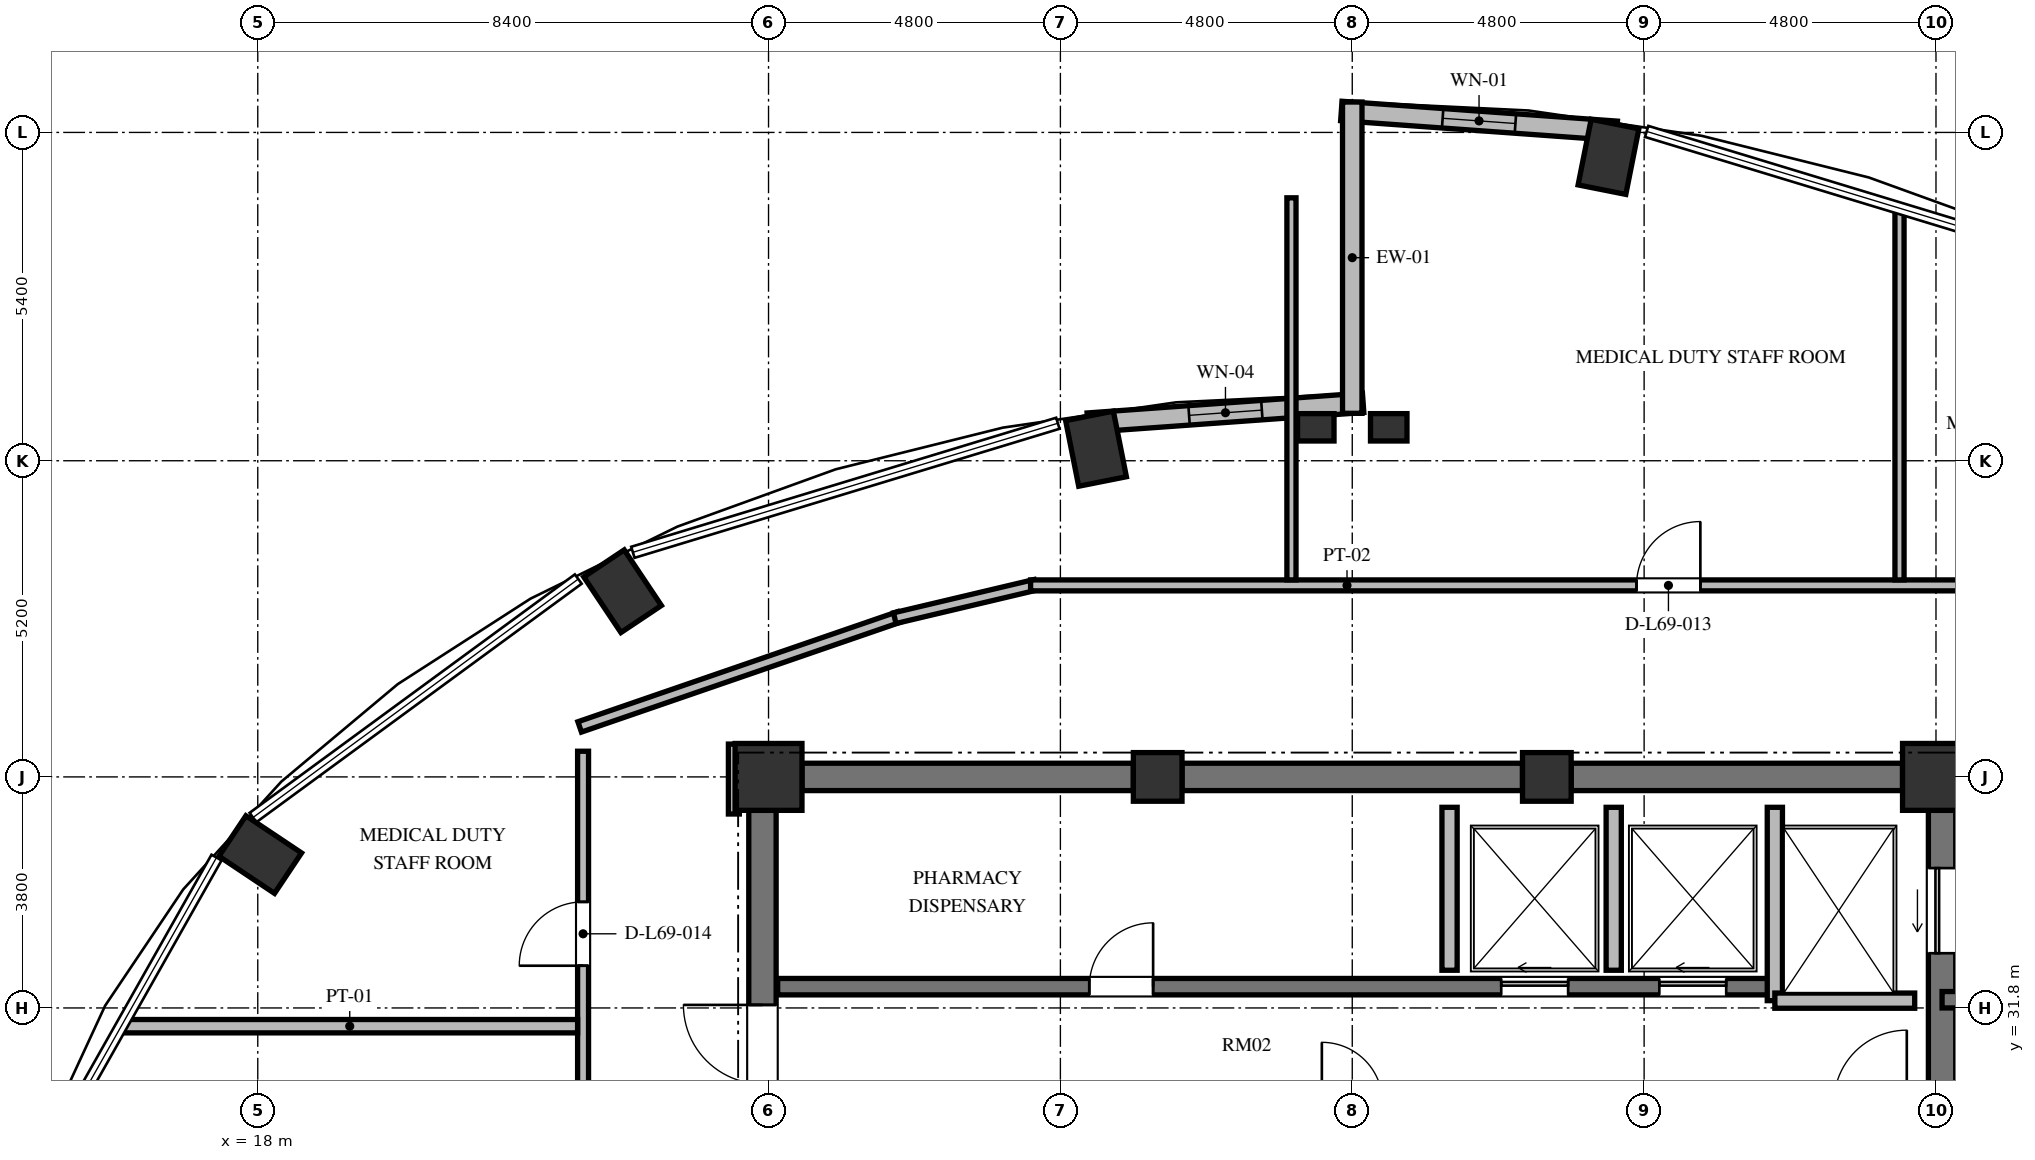
"""IFC4 building model, lengths in metres.
Left out: names, types, materials, properties, quantities, classifications, styles, units other than length and angle.
Written with IfcOpenShell. Run it as: python <this file> out.ifc"""

import sys

from ifc_helpers import new_model, si_unit, direction, frame, frame_2d, origin, origin_2d, place, context, subcontext, project, spatial, rectangle, extrude, element, fill, save


model = new_model("IFC4")
c1 = context("Model", 3, precision=1e-05, world=origin(), true_north=direction((0.0, 1.0)))
c2 = subcontext(c1, "Body", "Model", "MODEL_VIEW")
j1 = project(units=[si_unit("LENGTHUNIT", "METRE"), si_unit("PLANEANGLEUNIT", "RADIAN")], contexts=[c1])
p1 = place(None, origin())
s1 = spatial("IfcSite", under=j1, at=p1, CompositionType="ELEMENT")
p2 = place(p1, origin())
s2 = spatial("IfcBuilding", under=s1, at=p2, CompositionType="ELEMENT")
p3 = place(p2, frame((0.0, 0.0, 265.968)))
s3 = spatial("IfcBuildingStorey", under=s2, at=p3, CompositionType="ELEMENT", Elevation=265.968)
for number, where, z_axis, x_axis in (
    (1, (40.214, 45.798, 0.0), (0.0, 0.0, 1.0), (0.195, 0.981, 0.0)),
    (2, (31.786, 40.998, 0.0), (0.0, 0.0, 1.0), (-0.195, 0.981, 0.0)),
    (3, (24.0, 38.654, 0.0), (0.0, 0.0, 1.0), (-0.556, 0.831, 0.0)),
    (4, (18.04, 34.323, 0.0), (0.0, 0.0, 1.0), (-0.831, 0.556, 0.0)),
):
    element("IfcColumn", number, at=place(p3, frame(where, z_axis=z_axis, x_axis=x_axis)), inside=s3, PredefinedType="COLUMN", context=c2, shape_type="SweptSolid", body=[
        extrude(rectangle(XDim=1.1, YDim=0.8, at=origin_2d()), origin(), (0.0, 0.0, 1.0), 3.648),
    ])
p4 = place(p3, frame((45.6, 35.6, 0.0), z_axis=(0.0, 0.0, 1.0), x_axis=(1.0, 0.0, 0.0)))
e5 = element("IfcColumn", 5, at=p4, inside=s3, PredefinedType="COLUMN", context=c2, shape_type="SweptSolid", body=[
    extrude(rectangle(XDim=1.1, YDim=1.1, at=origin_2d()), origin(), (0.0, 0.0, 1.0), 3.648),
])
for number, where, z_axis, x_axis in (
    (6, (39.2, 35.6, 0.0), (0.0, 0.0, 1.0), (1.0, 0.0, 0.0)),
    (7, (32.8, 35.6, 0.0), (0.0, 0.0, 1.0), (1.0, 0.0, 0.0)),
):
    element("IfcColumn", number, at=place(p3, frame(where, z_axis=z_axis, x_axis=x_axis)), inside=s3, PredefinedType="COLUMN", context=c2, shape_type="SweptSolid", body=[
        extrude(rectangle(XDim=0.8, YDim=0.8, at=origin_2d()), origin(), (0.0, 0.0, 1.0), 3.648),
    ])
p5 = place(p3, frame((26.4, 35.6, 0.0), z_axis=(0.0, 0.0, 1.0), x_axis=(1.0, 0.0, 0.0)))
e8 = element("IfcColumn", 8, at=p5, inside=s3, PredefinedType="COLUMN", context=c2, shape_type="SweptSolid", body=[
    extrude(rectangle(XDim=1.1, YDim=1.1, at=origin_2d()), origin(), (0.0, 0.0, 1.0), 3.648),
])
for number, where, z_axis, x_axis in (
    (9, (35.4, 41.35, 0.0), (0.0, 0.0, 1.0), (1.0, 0.0, 0.0)),
    (10, (36.6, 41.35, 0.0), (0.0, 0.0, 1.0), (1.0, 0.0, 0.0)),
):
    element("IfcColumn", number, at=place(p3, frame(where, z_axis=z_axis, x_axis=x_axis)), inside=s3, PredefinedType="PILASTER", context=c2, shape_type="SweptSolid", body=[
        extrude(rectangle(XDim=0.6, YDim=0.45, at=origin_2d()), origin(), (0.0, 0.0, 1.0), 3.648),
    ])
p6 = place(p3, frame((26.3, 20.95, 0.0), z_axis=(0.0, 0.0, 1.0), x_axis=(0.0, 1.0, 0.0)))
e11 = element("IfcWall", 11, at=p6, inside=s3, PredefinedType="SHEAR", context=c2, shape_type="SweptSolid", body=[
    extrude(rectangle(XDim=14.1, YDim=0.45, at=frame_2d((7.05, 0.0))), origin(), (0.0, 0.0, 1.0), 3.648),
])
p7 = place(p6, frame((6.5, 0.0, 0.0)))
e12 = element("IfcOpeningElement", 12, at=p7, cuts=e11, PredefinedType="OPENING", context=c2, shape_type="SweptSolid", body=[
    extrude(rectangle(XDim=1.2, YDim=2.15, at=frame_2d((0.6, 1.075))), frame((0.0, 0.235, 0.0), z_axis=(0.0, -1.0, 0.0), x_axis=(1.0, 0.0, 0.0)), (0.0, 0.0, 1.0), 0.47),
])
p8 = place(p6, frame((9.6, 0.0, 0.0)))
e13 = element("IfcOpeningElement", 13, at=p8, cuts=e11, PredefinedType="OPENING", context=c2, shape_type="SweptSolid", body=[
    extrude(rectangle(XDim=1.3, YDim=2.2, at=frame_2d((0.65, 1.1))), frame((0.0, 0.235, 0.0), z_axis=(0.0, -1.0, 0.0), x_axis=(1.0, 0.0, 0.0)), (0.0, 0.0, 1.0), 0.47),
])
p9 = place(p6, frame((2.85, 0.0, 0.0)))
e14 = element("IfcOpeningElement", 14, at=p9, cuts=e11, PredefinedType="OPENING", context=c2, shape_type="SweptSolid", body=[
    extrude(rectangle(XDim=1.0, YDim=2.04, at=frame_2d((0.5, 1.02))), frame((0.0, 0.235, 0.0), z_axis=(0.0, -1.0, 0.0), x_axis=(1.0, 0.0, 0.0)), (0.0, 0.0, 1.0), 0.47),
])
p10 = place(p3, frame((45.7, 20.95, 0.0), z_axis=(0.0, 0.0, 1.0), x_axis=(0.0, 1.0, 0.0)))
e15 = element("IfcWall", 15, at=p10, inside=s3, PredefinedType="SHEAR", context=c2, shape_type="SweptSolid", body=[
    extrude(rectangle(XDim=14.1, YDim=0.45, at=frame_2d((7.05, 0.0))), origin(), (0.0, 0.0, 1.0), 3.648),
])
p11 = place(p10, frame((11.75, 0.0, 0.0)))
e16 = element("IfcOpeningElement", 16, at=p11, cuts=e15, PredefinedType="OPENING", context=c2, shape_type="SweptSolid", body=[
    extrude(rectangle(XDim=1.4, YDim=2.3, at=frame_2d((0.7, 1.15))), frame((0.0, 0.235, 0.0), z_axis=(0.0, -1.0, 0.0), x_axis=(1.0, 0.0, 0.0)), (0.0, 0.0, 1.0), 0.47),
])
p12 = place(p10, frame((0.95, 0.0, 0.0)))
e17 = element("IfcOpeningElement", 17, at=p12, cuts=e15, PredefinedType="OPENING", context=c2, shape_type="SweptSolid", body=[
    extrude(rectangle(XDim=1.4, YDim=2.3, at=frame_2d((0.7, 1.15))), frame((0.0, 0.235, 0.0), z_axis=(0.0, -1.0, 0.0), x_axis=(1.0, 0.0, 0.0)), (0.0, 0.0, 1.0), 0.47),
])
p13 = place(p3, frame((26.95, 35.6, 0.0), z_axis=(0.0, 0.0, 1.0), x_axis=(1.0, 0.0, 0.0)))
e18 = element("IfcWall", 18, at=p13, inside=s3, PredefinedType="SHEAR", context=c2, shape_type="SweptSolid", body=[
    extrude(rectangle(XDim=5.45, YDim=0.45, at=frame_2d((2.725, 0.0))), origin(), (0.0, 0.0, 1.0), 3.648),
])
p14 = place(p3, frame((33.2, 35.6, 0.0), z_axis=(0.0, 0.0, 1.0), x_axis=(1.0, 0.0, 0.0)))
e19 = element("IfcWall", 19, at=p14, inside=s3, PredefinedType="SHEAR", context=c2, shape_type="SweptSolid", body=[
    extrude(rectangle(XDim=5.6, YDim=0.45, at=frame_2d((2.8, 0.0))), origin(), (0.0, 0.0, 1.0), 3.648),
])
p15 = place(p3, frame((39.6, 35.6, 0.0), z_axis=(0.0, 0.0, 1.0), x_axis=(1.0, 0.0, 0.0)))
e20 = element("IfcWall", 20, at=p15, inside=s3, PredefinedType="SHEAR", context=c2, shape_type="SweptSolid", body=[
    extrude(rectangle(XDim=5.45, YDim=0.45, at=frame_2d((2.725, 0.0))), origin(), (0.0, 0.0, 1.0), 3.648),
])
p16 = place(p3, frame((40.35, 46.226, 0.0), z_axis=(0.0, 0.0, 1.0), x_axis=(-0.997409061056, 0.071938619141, 0.0)))
e21 = element("IfcWall", 21, at=p16, inside=s3, PredefinedType="SOLIDWALL", context=c2, shape_type="SweptSolid", body=[
    extrude(rectangle(XDim=4.541, YDim=0.32, at=frame_2d((2.271, 0.0))), origin(), (0.0, 0.0, 1.0), 3.198),
])
p17 = place(p16, frame((1.67, 0.0, 0.85)))
e22 = element("IfcOpeningElement", 22, at=p17, cuts=e21, PredefinedType="OPENING", context=c2, shape_type="SweptSolid", body=[
    extrude(rectangle(XDim=1.2, YDim=2.2, at=frame_2d((0.6, 1.1))), frame((0.0, 0.17, 0.0), z_axis=(0.0, -1.0, 0.0), x_axis=(1.0, 0.0, 0.0)), (0.0, 0.0, 1.0), 0.34),
])
p18 = place(p3, frame((36.179, 41.753, 0.0), z_axis=(0.0, 0.0, 1.0), x_axis=(-0.997408782787, -0.071942477163, 0.0)))
e23 = element("IfcWall", 23, at=p18, inside=s3, PredefinedType="SOLIDWALL", context=c2, shape_type="SweptSolid", body=[
    extrude(rectangle(XDim=4.541, YDim=0.32, at=frame_2d((2.27, 0.0))), origin(), (0.0, 0.0, 1.0), 3.198),
])
p19 = place(p18, frame((1.67, 0.0, 0.833)))
e24 = element("IfcOpeningElement", 24, at=p19, cuts=e23, PredefinedType="OPENING", context=c2, shape_type="SweptSolid", body=[
    extrude(rectangle(XDim=1.2, YDim=1.8, at=frame_2d((0.6, 0.9))), frame((0.0, 0.17, 0.0), z_axis=(0.0, -1.0, 0.0), x_axis=(1.0, 0.0, 0.0)), (0.0, 0.0, 1.0), 0.34),
])
p20 = place(p3, frame((36.0, 46.7, 0.0), z_axis=(0.0, 0.0, 1.0), x_axis=(0.0, -1.0, 0.0)))
e25 = element("IfcWall", 25, at=p20, inside=s3, PredefinedType="SOLIDWALL", context=c2, shape_type="SweptSolid", body=[
    extrude(rectangle(XDim=5.12, YDim=0.32, at=frame_2d((2.56, 0.0))), origin(), (0.0, 0.0, 1.0), 3.198),
])
p21 = place(p3, frame((26.55, 32.15, 0.0), z_axis=(0.0, 0.0, 1.0), x_axis=(1.0, 0.0, 0.0)))
e26 = element("IfcWall", 26, at=p21, inside=s3, PredefinedType="SHEAR", context=c2, shape_type="SweptSolid", body=[
    extrude(rectangle(XDim=16.4, YDim=0.27, at=frame_2d((8.2, 0.0))), origin(), (0.0, 0.0, 1.0), 3.648),
])
p22 = place(p21, frame((5.125, 0.0, 0.0)))
e27 = element("IfcOpeningElement", 27, at=p22, cuts=e26, PredefinedType="OPENING", context=c2, shape_type="SweptSolid", body=[
    extrude(rectangle(XDim=1.05, YDim=2.15, at=frame_2d((0.525, 1.075))), frame((0.0, 0.145, 0.0), z_axis=(0.0, -1.0, 0.0), x_axis=(1.0, 0.0, 0.0)), (0.0, 0.0, 1.0), 0.29),
])
p23 = place(p21, frame((11.9, 0.0, 0.0)))
e28 = element("IfcOpeningElement", 28, at=p23, cuts=e26, PredefinedType="OPENING", context=c2, shape_type="SweptSolid", body=[
    extrude(rectangle(XDim=1.1, YDim=2.2, at=frame_2d((0.55, 1.1))), frame((0.0, 0.145, 0.0), z_axis=(0.0, -1.0, 0.0), x_axis=(1.0, 0.0, 0.0)), (0.0, 0.0, 1.0), 0.29),
])
p24 = place(p21, frame((14.5, 0.0, 0.0)))
e29 = element("IfcOpeningElement", 29, at=p24, cuts=e26, PredefinedType="OPENING", context=c2, shape_type="SweptSolid", body=[
    extrude(rectangle(XDim=1.1, YDim=2.2, at=frame_2d((0.55, 1.1))), frame((0.0, 0.145, 0.0), z_axis=(0.0, -1.0, 0.0), x_axis=(1.0, 0.0, 0.0)), (0.0, 0.0, 1.0), 0.29),
])
p25 = place(p3, frame((42.95, 31.92, 0.0), z_axis=(0.0, 0.0, 1.0), x_axis=(0.0, 1.0, 0.0)))
e30 = element("IfcWall", 30, at=p25, inside=s3, PredefinedType="SOLIDWALL", context=c2, shape_type="SweptSolid", body=[
    extrude(rectangle(XDim=3.18, YDim=0.25, at=frame_2d((1.59, 0.0))), origin(), (0.0, 0.0, 1.0), 3.198),
])
p26 = place(p3, frame((42.95, 31.92, 0.0), z_axis=(0.0, 0.0, 1.0), x_axis=(1.0, 0.0, 0.0)))
e31 = element("IfcWall", 31, at=p26, inside=s3, PredefinedType="SOLIDWALL", context=c2, shape_type="SweptSolid", body=[
    extrude(rectangle(XDim=2.3, YDim=0.25, at=frame_2d((1.15, 0.0))), origin(), (0.0, 0.0, 1.0), 3.198),
])
for number, where, z_axis, x_axis in (
    (32, (37.6, 32.42, 0.0), (0.0, 0.0, 1.0), (0.0, 1.0, 0.0)),
    (33, (40.3, 32.42, 0.0), (0.0, 0.0, 1.0), (0.0, 1.0, 0.0)),
):
    element("IfcWall", number, at=place(p3, frame(where, z_axis=z_axis, x_axis=x_axis)), inside=s3, PredefinedType="SOLIDWALL", context=c2, shape_type="SweptSolid", body=[
        extrude(rectangle(XDim=2.68, YDim=0.25, at=frame_2d((1.34, 0.0))), origin(), (0.0, 0.0, 1.0), 3.198),
    ])
p27 = place(p3, frame((45.7, 31.935, 0.0), z_axis=(0.0, 0.0, 1.0), x_axis=(1.0, 0.0, 0.0)))
e34 = element("IfcWall", 34, at=p27, inside=s3, PredefinedType="SHEAR", context=c2, shape_type="SweptSolid", body=[
    extrude(rectangle(XDim=4.715, YDim=0.27, at=frame_2d((2.357, 0.0))), origin(), (0.0, 0.0, 1.0), 3.648),
])
p28 = place(p3, frame((23.294, 36.422, 0.0), z_axis=(0.0, 0.0, 1.0), x_axis=(0.945493277461, 0.325641616316, 0.0)))
e35 = element("IfcWall", 35, at=p28, inside=s3, PredefinedType="PARTITIONING", context=c2, shape_type="SweptSolid", body=[
    extrude(rectangle(XDim=5.562, YDim=0.18, at=frame_2d((2.781, 0.0))), origin(), (0.0, 0.0, 1.0), 2.283),
])
p29 = place(p3, frame((28.476, 38.211, 0.0), z_axis=(0.0, 0.0, 1.0), x_axis=(0.973030562203, 0.230676234189, 0.0)))
e36 = element("IfcWall", 36, at=p29, inside=s3, PredefinedType="PARTITIONING", context=c2, shape_type="SweptSolid", body=[
    extrude(rectangle(XDim=2.377, YDim=0.18, at=frame_2d((1.188, 0.0))), origin(), (0.0, 0.0, 1.0), 3.198),
])
p30 = place(p3, frame((30.71, 38.75, 0.0), z_axis=(0.0, 0.0, 1.0), x_axis=(1.0, 0.0, 0.0)))
e37 = element("IfcWall", 37, at=p30, inside=s3, PredefinedType="PARTITIONING", context=c2, shape_type="SweptSolid", body=[
    extrude(rectangle(XDim=20.815, YDim=0.18, at=frame_2d((10.408, 0.0))), origin(), (0.0, 0.0, 1.0), 2.823),
])
p31 = place(p30, frame((16.869, 0.0, 0.0)))
e38 = element("IfcOpeningElement", 38, at=p31, cuts=e37, PredefinedType="OPENING", context=c2, shape_type="SweptSolid", body=[
    extrude(rectangle(XDim=1.05, YDim=2.15, at=frame_2d((0.525, 1.075))), frame((0.0, 0.1, 0.0), z_axis=(0.0, -1.0, 0.0), x_axis=(1.0, 0.0, 0.0)), (0.0, 0.0, 1.0), 0.2),
])
p32 = place(p30, frame((9.965, 0.0, 0.0)))
e39 = element("IfcOpeningElement", 39, at=p32, cuts=e37, PredefinedType="OPENING", context=c2, shape_type="SweptSolid", body=[
    extrude(rectangle(XDim=1.05, YDim=2.15, at=frame_2d((0.525, 1.075))), frame((0.0, 0.1, 0.0), z_axis=(0.0, -1.0, 0.0), x_axis=(1.0, 0.0, 0.0)), (0.0, 0.0, 1.0), 0.2),
])
p33 = place(p3, frame((25.83, 36.14, 0.0), z_axis=(0.0, 0.0, 1.0), x_axis=(0.0, -1.0, 0.0)))
e40 = element("IfcWall", 40, at=p33, inside=s3, PredefinedType="PARTITIONING", context=c2, shape_type="SweptSolid", body=[
    extrude(rectangle(XDim=1.15, YDim=0.18, at=frame_2d((0.575, 0.0))), origin(), (0.0, 0.0, 1.0), 3.198),
])
p34 = place(p3, frame((23.35, 19.98, 0.0), z_axis=(0.0, 0.0, 1.0), x_axis=(0.0, 1.0, 0.0)))
e41 = element("IfcWall", 41, at=p34, inside=s3, PredefinedType="PARTITIONING", context=c2, shape_type="SweptSolid", body=[
    extrude(rectangle(XDim=16.042, YDim=0.18, at=frame_2d((8.021, 0.0))), origin(), (0.0, 0.0, 1.0), 3.198),
])
p35 = place(p34, frame((2.144, 0.0, 0.0)))
e42 = element("IfcOpeningElement", 42, at=p35, cuts=e41, PredefinedType="OPENING", context=c2, shape_type="SweptSolid", body=[
    extrude(rectangle(XDim=1.05, YDim=2.15, at=frame_2d((0.525, 1.075))), frame((0.0, 0.1, 0.0), z_axis=(0.0, -1.0, 0.0), x_axis=(1.0, 0.0, 0.0)), (0.0, 0.0, 1.0), 0.2),
])
p36 = place(p34, frame((12.515, 0.0, 0.0)))
e43 = element("IfcOpeningElement", 43, at=p36, cuts=e41, PredefinedType="OPENING", context=c2, shape_type="SweptSolid", body=[
    extrude(rectangle(XDim=1.05, YDim=2.15, at=frame_2d((0.525, 1.075))), frame((0.0, 0.1, 0.0), z_axis=(0.0, -1.0, 0.0), x_axis=(1.0, 0.0, 0.0)), (0.0, 0.0, 1.0), 0.2),
])
p37 = place(p34, frame((7.728, 0.0, 0.0)))
e44 = element("IfcOpeningElement", 44, at=p37, cuts=e41, PredefinedType="OPENING", context=c2, shape_type="SweptSolid", body=[
    extrude(rectangle(XDim=1.05, YDim=2.15, at=frame_2d((0.525, 1.075))), frame((0.0, 0.1, 0.0), z_axis=(0.0, -1.0, 0.0), x_axis=(1.0, 0.0, 0.0)), (0.0, 0.0, 1.0), 0.2),
])
p38 = place(p3, frame((15.765, 31.5, 0.0), z_axis=(0.0, 0.0, 1.0), x_axis=(1.0, 0.0, 0.0)))
e45 = element("IfcWall", 45, at=p38, inside=s3, PredefinedType="PARTITIONING", context=c2, shape_type="SweptSolid", body=[
    extrude(rectangle(XDim=7.495, YDim=0.22, at=frame_2d((3.748, 0.0))), origin(), (0.0, 0.0, 1.0), 3.198),
])
p39 = place(p3, frame((35.0, 38.84, 0.0), z_axis=(0.0, 0.0, 1.0), x_axis=(0.0, 1.0, 0.0)))
e46 = element("IfcWall", 46, at=p39, inside=s3, PredefinedType="PARTITIONING", context=c2, shape_type="SweptSolid", body=[
    extrude(rectangle(XDim=6.284, YDim=0.15, at=frame_2d((3.142, 0.0))), origin(), (0.0, 0.0, 1.0), 3.198),
])
p40 = place(p3, frame((45.0, 38.84, 0.0), z_axis=(0.0, 0.0, 1.0), x_axis=(0.0, 1.0, 0.0)))
e47 = element("IfcWall", 47, at=p40, inside=s3, PredefinedType="PARTITIONING", context=c2, shape_type="SweptSolid", body=[
    extrude(rectangle(XDim=6.097, YDim=0.15, at=frame_2d((3.048, 0.0))), origin(), (0.0, 0.0, 1.0), 3.198),
])
p41 = place(p17, origin())
e48 = element("IfcWindow", 48, at=p41, inside=s3, PartitioningType="SINGLE_PANEL", PredefinedType="WINDOW", context=c2, shape_type="SweptSolid", body=[
    extrude(rectangle(XDim=1.2, YDim=2.2, at=frame_2d((0.6, 1.1))), frame((0.0, 0.03, 0.0), z_axis=(0.0, -1.0, 0.0), x_axis=(1.0, 0.0, 0.0)), (0.0, 0.0, 1.0), 0.06),
])
fill(e22, e48)
p42 = place(p19, origin())
e49 = element("IfcWindow", 49, at=p42, inside=s3, PartitioningType="SINGLE_PANEL", PredefinedType="WINDOW", context=c2, shape_type="SweptSolid", body=[
    extrude(rectangle(XDim=1.2, YDim=1.8, at=frame_2d((0.6, 0.9))), frame((0.0, 0.03, 0.0), z_axis=(0.0, -1.0, 0.0), x_axis=(1.0, 0.0, 0.0)), (0.0, 0.0, 1.0), 0.06),
])
fill(e24, e49)
p43 = place(p8, origin())
e50 = element("IfcDoor", 50, at=p43, inside=s3, OperationType="SINGLE_SWING_RIGHT", PredefinedType="DOOR", context=c2, shape_type="SweptSolid", body=[
    extrude(rectangle(XDim=1.3, YDim=2.2, at=frame_2d((0.65, 1.1))), frame((0.0, 0.025, 0.0), z_axis=(0.0, -1.0, 0.0), x_axis=(1.0, 0.0, 0.0)), (0.0, 0.0, 1.0), 0.05),
])
fill(e13, e50)
p44 = place(p22, origin())
e51 = element("IfcDoor", 51, at=p44, inside=s3, OperationType="SINGLE_SWING_RIGHT", PredefinedType="DOOR", context=c2, shape_type="SweptSolid", body=[
    extrude(rectangle(XDim=1.05, YDim=2.15, at=frame_2d((0.525, 1.075))), frame((0.0, 0.025, 0.0), z_axis=(0.0, -1.0, 0.0), x_axis=(1.0, 0.0, 0.0)), (0.0, 0.0, 1.0), 0.05),
])
fill(e27, e51)
p45 = place(p23, origin())
e52 = element("IfcDoor", 52, at=p45, inside=s3, OperationType="SLIDING_TO_LEFT", PredefinedType="DOOR", context=c2, shape_type="SweptSolid", body=[
    extrude(rectangle(XDim=1.1, YDim=2.2, at=frame_2d((0.55, 1.1))), frame((0.0, 0.025, 0.0), z_axis=(0.0, -1.0, 0.0), x_axis=(1.0, 0.0, 0.0)), (0.0, 0.0, 1.0), 0.05),
])
fill(e28, e52)
p46 = place(p24, origin())
e53 = element("IfcDoor", 53, at=p46, inside=s3, OperationType="SLIDING_TO_LEFT", PredefinedType="DOOR", context=c2, shape_type="SweptSolid", body=[
    extrude(rectangle(XDim=1.1, YDim=2.2, at=frame_2d((0.55, 1.1))), frame((0.0, 0.025, 0.0), z_axis=(0.0, -1.0, 0.0), x_axis=(1.0, 0.0, 0.0)), (0.0, 0.0, 1.0), 0.05),
])
fill(e29, e53)
p47 = place(p11, origin())
e54 = element("IfcDoor", 54, at=p47, inside=s3, OperationType="SLIDING_TO_LEFT", PredefinedType="DOOR", context=c2, shape_type="SweptSolid", body=[
    extrude(rectangle(XDim=1.4, YDim=2.3, at=frame_2d((0.7, 1.15))), frame((0.0, 0.025, 0.0), z_axis=(0.0, -1.0, 0.0), x_axis=(1.0, 0.0, 0.0)), (0.0, 0.0, 1.0), 0.05),
])
fill(e16, e54)
p48 = place(p32, origin())
e55 = element("IfcDoor", 55, at=p48, inside=s3, OperationType="SINGLE_SWING_RIGHT", PredefinedType="DOOR", context=c2, shape_type="SweptSolid", body=[
    extrude(rectangle(XDim=1.05, YDim=2.15, at=frame_2d((0.525, 1.075))), frame((0.0, 0.025, 0.0), z_axis=(0.0, -1.0, 0.0), x_axis=(1.0, 0.0, 0.0)), (0.0, 0.0, 1.0), 0.05),
])
fill(e39, e55)
p49 = place(p36, origin())
e56 = element("IfcDoor", 56, at=p49, inside=s3, OperationType="SINGLE_SWING_LEFT", PredefinedType="DOOR", context=c2, shape_type="SweptSolid", body=[
    extrude(rectangle(XDim=1.05, YDim=2.15, at=frame_2d((0.525, 1.075))), frame((0.0, 0.025, 0.0), z_axis=(0.0, -1.0, 0.0), x_axis=(1.0, 0.0, 0.0)), (0.0, 0.0, 1.0), 0.05),
])
fill(e43, e56)
save(model, sys.argv[1])
